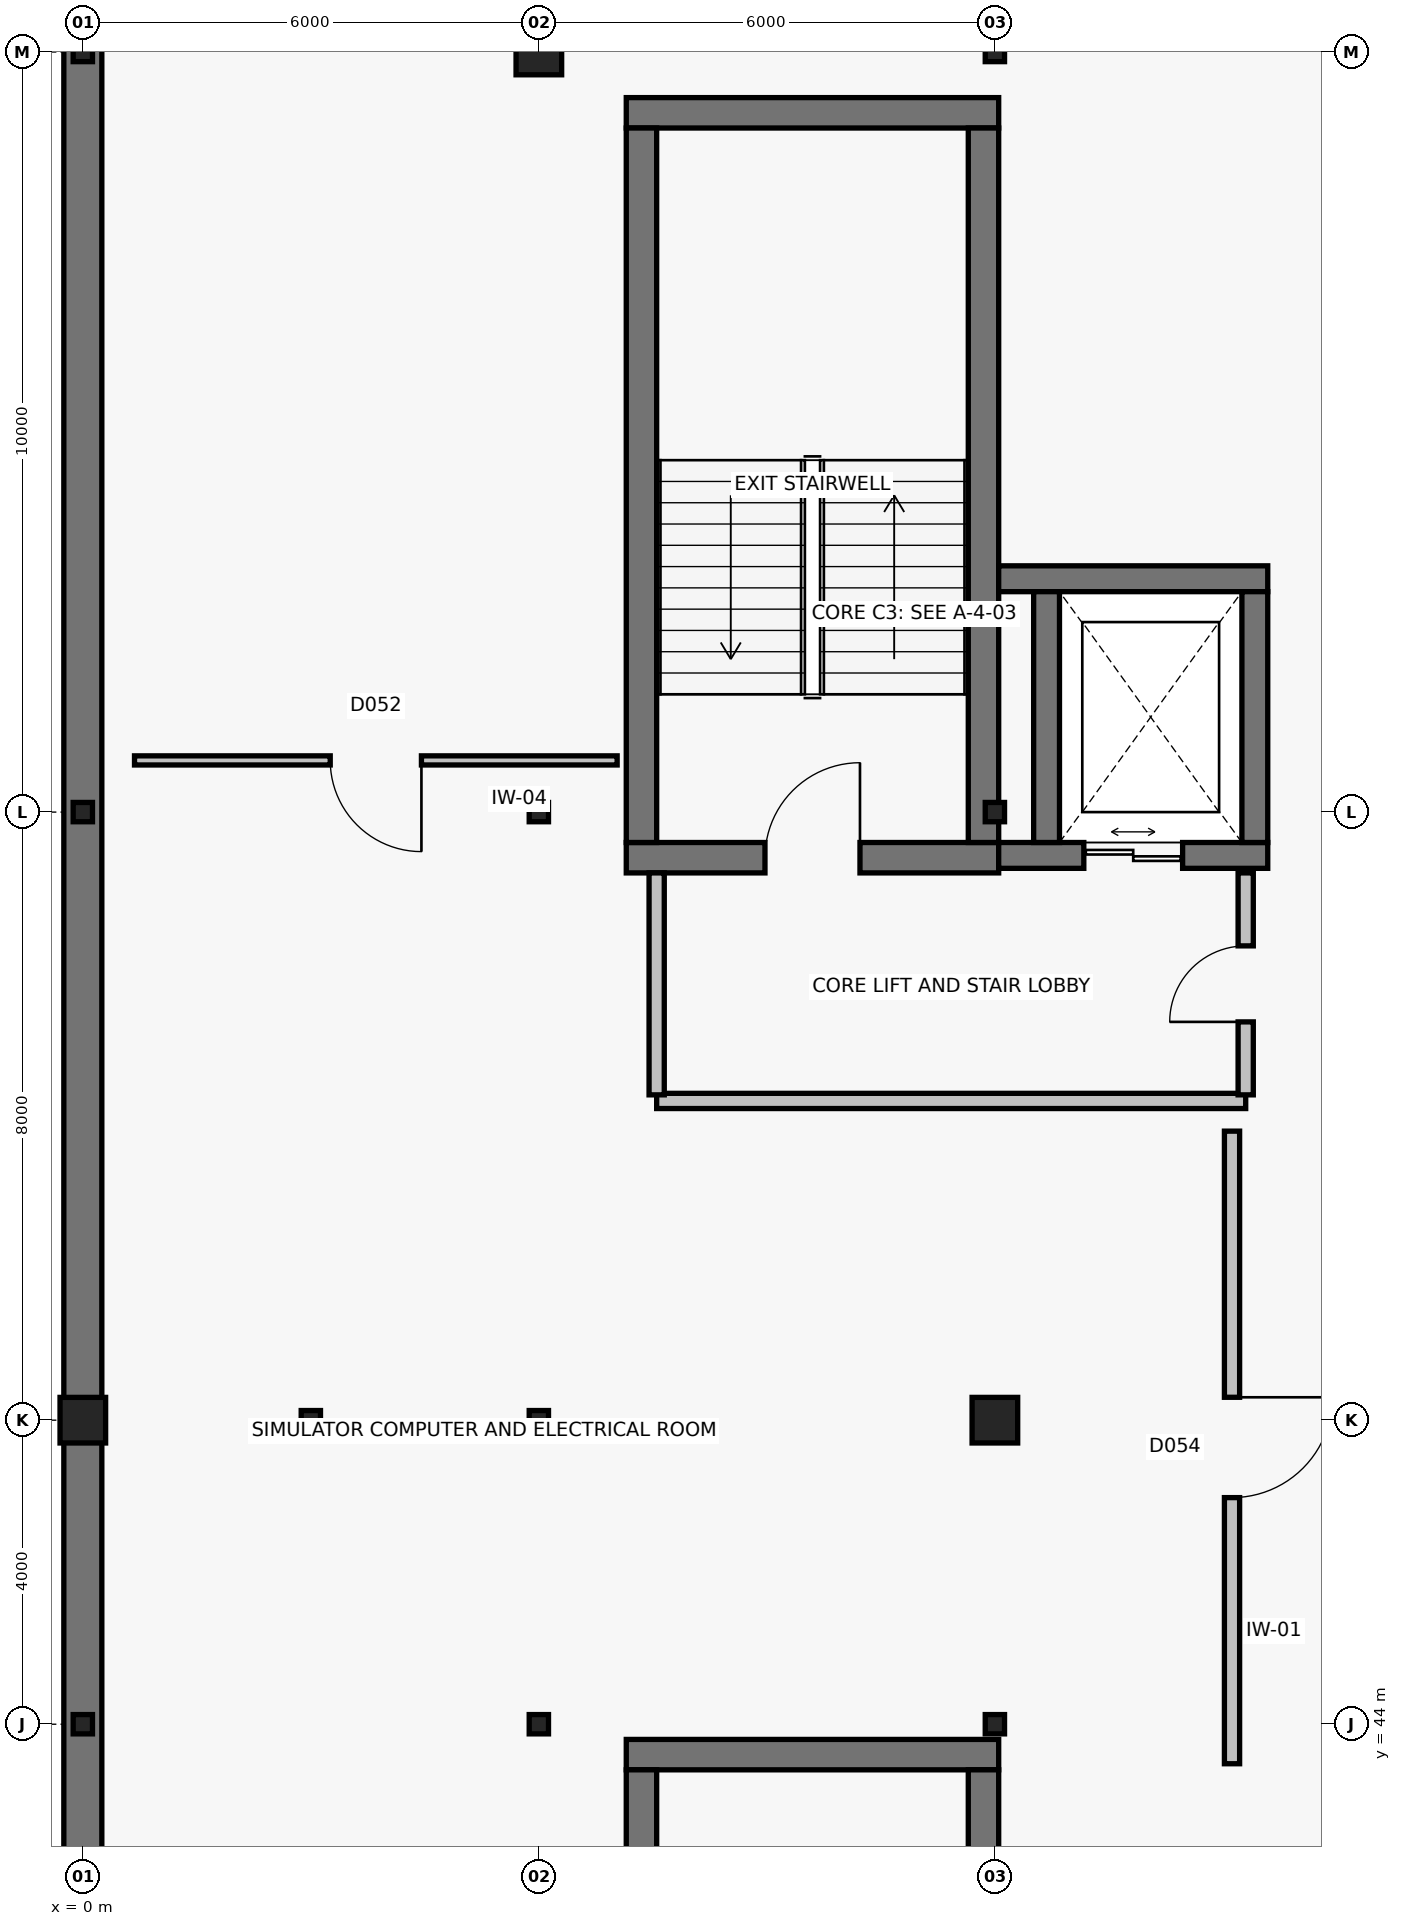
"""IFC4 building model, lengths in metres.
Left out: names, types, materials, properties, quantities, classifications, styles, units other than length and angle.
Written with IfcOpenShell. Run it as: python <this file> out.ifc"""

import sys

from ifc_helpers import new_model, si_unit, direction, frame, frame_2d, origin, origin_2d, place, context, subcontext, project, spatial, rectangle, hollow_rectangle, extrude, element, fill, save


model = new_model("IFC4")
c1 = context("Model", 3, precision=1e-05, world=origin(), true_north=direction((0.0, 1.0)))
c2 = subcontext(c1, "Body", "Model", "MODEL_VIEW")
j1 = project(units=[si_unit("LENGTHUNIT", "METRE"), si_unit("PLANEANGLEUNIT", "RADIAN")], contexts=[c1])
p1 = place(None, origin())
s1 = spatial("IfcSite", under=j1, at=p1, CompositionType="ELEMENT")
p2 = place(p1, origin())
s2 = spatial("IfcBuilding", under=s1, at=p2, CompositionType="ELEMENT")
p3 = place(p2, frame((0.0, 0.0, 15.4)))
s3 = spatial("IfcBuildingStorey", under=s2, at=p3, CompositionType="ELEMENT", Elevation=15.4)
p4 = place(p3, frame((0.0, 44.0, 0.0), z_axis=(0.0, 0.0, 1.0), x_axis=(1.0, 0.0, 0.0)))
e1 = element("IfcColumn", 1, at=p4, inside=s3, PredefinedType="COLUMN", context=c2, shape_type="SweptSolid", body=[
    extrude(hollow_rectangle(XDim=0.254, YDim=0.254, WallThickness=0.01, InnerFilletRadius=0.01, OuterFilletRadius=0.019, at=origin_2d()), origin(), (0.0, 0.0, 1.0), 4.0),
])
p5 = place(p3, frame((0.0, 48.0, 0.0), z_axis=(0.0, 0.0, 1.0), x_axis=(1.0, 0.0, 0.0)))
e2 = element("IfcColumn", 2, at=p5, inside=s3, PredefinedType="COLUMN", context=c2, shape_type="SweptSolid", body=[
    extrude(rectangle(XDim=0.6, YDim=0.6, at=origin_2d()), origin(), (0.0, 0.0, 1.0), 4.0),
])
for number, where, z_axis, x_axis in (
    (3, (0.0, 56.0, 0.0), (0.0, 0.0, 1.0), (1.0, 0.0, 0.0)),
    (4, (0.0, 66.0, 0.0), (0.0, 0.0, 1.0), (1.0, 0.0, 0.0)),
    (5, (3.0, 48.0, 0.0), (0.0, 0.0, 1.0), (1.0, 0.0, 0.0)),
    (6, (6.0, 44.0, 0.0), (0.0, 0.0, 1.0), (1.0, 0.0, 0.0)),
    (7, (6.0, 48.0, 0.0), (0.0, 0.0, 1.0), (1.0, 0.0, 0.0)),
    (8, (6.0, 56.0, 0.0), (0.0, 0.0, 1.0), (1.0, 0.0, 0.0)),
):
    element("IfcColumn", number, at=place(p3, frame(where, z_axis=z_axis, x_axis=x_axis)), inside=s3, PredefinedType="COLUMN", context=c2, shape_type="SweptSolid", body=[
        extrude(hollow_rectangle(XDim=0.254, YDim=0.254, WallThickness=0.01, InnerFilletRadius=0.01, OuterFilletRadius=0.019, at=origin_2d()), origin(), (0.0, 0.0, 1.0), 4.0),
    ])
p6 = place(p3, frame((6.0, 66.0, 0.0), z_axis=(0.0, 0.0, 1.0), x_axis=(1.0, 0.0, 0.0)))
e9 = element("IfcColumn", 9, at=p6, inside=s3, PredefinedType="COLUMN", context=c2, shape_type="SweptSolid", body=[
    extrude(rectangle(XDim=0.6, YDim=0.6, at=origin_2d()), origin(), (0.0, 0.0, 1.0), 4.0),
])
p7 = place(p3, frame((12.0, 44.0, 0.0), z_axis=(0.0, 0.0, 1.0), x_axis=(1.0, 0.0, 0.0)))
e10 = element("IfcColumn", 10, at=p7, inside=s3, PredefinedType="COLUMN", context=c2, shape_type="SweptSolid", body=[
    extrude(hollow_rectangle(XDim=0.254, YDim=0.254, WallThickness=0.01, InnerFilletRadius=0.01, OuterFilletRadius=0.019, at=origin_2d()), origin(), (0.0, 0.0, 1.0), 4.0),
])
p8 = place(p3, frame((12.0, 48.0, 0.0), z_axis=(0.0, 0.0, 1.0), x_axis=(1.0, 0.0, 0.0)))
e11 = element("IfcColumn", 11, at=p8, inside=s3, PredefinedType="COLUMN", context=c2, shape_type="SweptSolid", body=[
    extrude(rectangle(XDim=0.6, YDim=0.6, at=origin_2d()), origin(), (0.0, 0.0, 1.0), 4.0),
])
for number, where, z_axis, x_axis in (
    (12, (12.0, 56.0, 0.0), (0.0, 0.0, 1.0), (1.0, 0.0, 0.0)),
    (13, (12.0, 66.0, 0.0), (0.0, 0.0, 1.0), (1.0, 0.0, 0.0)),
):
    element("IfcColumn", number, at=place(p3, frame(where, z_axis=z_axis, x_axis=x_axis)), inside=s3, PredefinedType="COLUMN", context=c2, shape_type="SweptSolid", body=[
        extrude(hollow_rectangle(XDim=0.254, YDim=0.254, WallThickness=0.01, InnerFilletRadius=0.01, OuterFilletRadius=0.019, at=origin_2d()), origin(), (0.0, 0.0, 1.0), 4.0),
    ])
p9 = place(p3, frame((0.0, -0.008, 0.0), z_axis=(0.0, 0.0, 1.0), x_axis=(0.0, 1.0, 0.0)))
e14 = element("IfcWall", 14, at=p9, inside=s3, PredefinedType="SOLIDWALL", context=c2, shape_type="SweptSolid", body=[
    extrude(rectangle(XDim=74.016, YDim=0.5, at=frame_2d((37.008, 0.0))), origin(), (0.0, 0.0, 1.0), 3.68),
])
p10 = place(p3, frame((12.05, 43.6, 0.0), z_axis=(0.0, 0.0, 1.0), x_axis=(-1.0, 0.0, 0.0)))
e15 = element("IfcWall", 15, at=p10, inside=s3, PredefinedType="SHEAR", context=c2, shape_type="SweptSolid", body=[
    extrude(rectangle(XDim=4.9, YDim=0.4, at=frame_2d((2.45, 0.0))), origin(), (0.0, 0.0, 1.0), 3.7),
])
for number, where, z_axis, x_axis in (
    (16, (7.35, 43.4, 0.0), (0.0, 0.0, 1.0), (0.0, -1.0, 0.0)),
    (17, (11.85, 34.0, 0.0), (0.0, 0.0, 1.0), (0.0, 1.0, 0.0)),
):
    element("IfcWall", number, at=place(p3, frame(where, z_axis=z_axis, x_axis=x_axis)), inside=s3, PredefinedType="SHEAR", context=c2, shape_type="SweptSolid", body=[
        extrude(rectangle(XDim=9.4, YDim=0.4, at=frame_2d((4.7, 0.0))), origin(), (0.0, 0.0, 1.0), 3.7),
    ])
p11 = place(p3, frame((7.15, 55.4, 0.0), z_axis=(0.0, 0.0, 1.0), x_axis=(1.0, 0.0, 0.0)))
e18 = element("IfcWall", 18, at=p11, inside=s3, PredefinedType="SHEAR", context=c2, shape_type="SweptSolid", body=[
    extrude(rectangle(XDim=4.9, YDim=0.4, at=frame_2d((2.45, 0.0))), origin(), (0.0, 0.0, 1.0), 3.7),
])
p12 = place(p11, frame((1.825, 0.0, 0.0)))
e19 = element("IfcOpeningElement", 19, at=p12, cuts=e18, PredefinedType="OPENING", context=c2, shape_type="SweptSolid", body=[
    extrude(rectangle(XDim=1.25, YDim=2.2, at=frame_2d((0.625, 1.1))), frame((0.0, 0.215, 0.0), z_axis=(0.0, -1.0, 0.0), x_axis=(1.0, 0.0, 0.0)), (0.0, 0.0, 1.0), 0.43),
])
p13 = place(p3, frame((12.05, 65.2, 0.0), z_axis=(0.0, 0.0, 1.0), x_axis=(-1.0, 0.0, 0.0)))
e20 = element("IfcWall", 20, at=p13, inside=s3, PredefinedType="SHEAR", context=c2, shape_type="SweptSolid", body=[
    extrude(rectangle(XDim=4.9, YDim=0.4, at=frame_2d((2.45, 0.0))), origin(), (0.0, 0.0, 1.0), 3.7),
])
for number, where, z_axis, x_axis in (
    (21, (7.35, 65.0, 0.0), (0.0, 0.0, 1.0), (0.0, -1.0, 0.0)),
    (22, (11.85, 55.6, 0.0), (0.0, 0.0, 1.0), (0.0, 1.0, 0.0)),
):
    element("IfcWall", number, at=place(p3, frame(where, z_axis=z_axis, x_axis=x_axis)), inside=s3, PredefinedType="SHEAR", context=c2, shape_type="SweptSolid", body=[
        extrude(rectangle(XDim=9.4, YDim=0.4, at=frame_2d((4.7, 0.0))), origin(), (0.0, 0.0, 1.0), 3.7),
    ])
p14 = place(p3, frame((12.05, 55.43, 0.0), z_axis=(0.0, 0.0, 1.0), x_axis=(1.0, 0.0, 0.0)))
e23 = element("IfcWall", 23, at=p14, inside=s3, PredefinedType="SHEAR", context=c2, shape_type="SweptSolid", body=[
    extrude(rectangle(XDim=3.54, YDim=0.34, at=frame_2d((1.77, 0.0))), origin(), (0.0, 0.0, 1.0), 3.7),
])
p15 = place(p14, frame((1.12, 0.0, 0.0)))
e24 = element("IfcOpeningElement", 24, at=p15, cuts=e23, PredefinedType="OPENING", context=c2, shape_type="SweptSolid", body=[
    extrude(rectangle(XDim=1.3, YDim=2.25, at=frame_2d((0.65, 1.125))), frame((0.0, 0.185, 0.0), z_axis=(0.0, -1.0, 0.0), x_axis=(1.0, 0.0, 0.0)), (0.0, 0.0, 1.0), 0.37),
])
p16 = place(p3, frame((15.59, 59.07, 0.0), z_axis=(0.0, 0.0, 1.0), x_axis=(-1.0, 0.0, 0.0)))
e25 = element("IfcWall", 25, at=p16, inside=s3, PredefinedType="SHEAR", context=c2, shape_type="SweptSolid", body=[
    extrude(rectangle(XDim=3.54, YDim=0.34, at=frame_2d((1.77, 0.0))), origin(), (0.0, 0.0, 1.0), 3.7),
])
for number, where, z_axis, x_axis in (
    (26, (12.68, 58.9, 0.0), (0.0, 0.0, 1.0), (0.0, -1.0, 0.0)),
    (27, (15.42, 55.6, 0.0), (0.0, 0.0, 1.0), (0.0, 1.0, 0.0)),
):
    element("IfcWall", number, at=place(p3, frame(where, z_axis=z_axis, x_axis=x_axis)), inside=s3, PredefinedType="SHEAR", context=c2, shape_type="SweptSolid", body=[
        extrude(rectangle(XDim=3.3, YDim=0.34, at=frame_2d((1.65, 0.0))), origin(), (0.0, 0.0, 1.0), 3.7),
    ])
p17 = place(p3, frame((7.55, 52.2, 0.0), z_axis=(0.0, 0.0, 1.0), x_axis=(1.0, 0.0, 0.0)))
e28 = element("IfcWall", 28, at=p17, inside=s3, PredefinedType="PARTITIONING", context=c2, shape_type="SweptSolid", body=[
    extrude(rectangle(XDim=7.75, YDim=0.2, at=frame_2d((3.875, 0.0))), origin(), (0.0, 0.0, 1.0), 2.957),
])
p18 = place(p3, frame((7.55, 55.2, 0.0), z_axis=(0.0, 0.0, 1.0), x_axis=(0.0, -1.0, 0.0)))
e29 = element("IfcWall", 29, at=p18, inside=s3, PredefinedType="PARTITIONING", context=c2, shape_type="SweptSolid", body=[
    extrude(rectangle(XDim=2.92, YDim=0.2, at=frame_2d((1.46, 0.0))), origin(), (0.0, 0.0, 1.0), 3.68),
])
p19 = place(p3, frame((15.3, 52.28, 0.0), z_axis=(0.0, 0.0, 1.0), x_axis=(0.0, 1.0, 0.0)))
e30 = element("IfcWall", 30, at=p19, inside=s3, PredefinedType="PARTITIONING", context=c2, shape_type="SweptSolid", body=[
    extrude(rectangle(XDim=2.92, YDim=0.2, at=frame_2d((1.46, 0.0))), origin(), (0.0, 0.0, 1.0), 3.68),
])
p20 = place(p19, frame((0.96, 0.0, 0.0)))
e31 = element("IfcOpeningElement", 31, at=p20, cuts=e30, PredefinedType="OPENING", context=c2, shape_type="SweptSolid", body=[
    extrude(rectangle(XDim=1.0, YDim=2.15, at=frame_2d((0.5, 1.075))), frame((0.0, 0.115, 0.0), z_axis=(0.0, -1.0, 0.0), x_axis=(1.0, 0.0, 0.0)), (0.0, 0.0, 1.0), 0.23),
])
p21 = place(p3, frame((7.03, 56.68, 0.0), z_axis=(0.0, 0.0, 1.0), x_axis=(-1.0, 0.0, 0.0)))
e32 = element("IfcWall", 32, at=p21, inside=s3, PredefinedType="PARTITIONING", context=c2, shape_type="SweptSolid", body=[
    extrude(rectangle(XDim=6.35, YDim=0.12, at=frame_2d((3.175, 0.0))), origin(), (0.0, 0.0, 1.0), 2.957),
])
p22 = place(p21, frame((2.575, 0.0, 0.0)))
e33 = element("IfcOpeningElement", 33, at=p22, cuts=e32, PredefinedType="OPENING", context=c2, shape_type="SweptSolid", body=[
    extrude(rectangle(XDim=1.2, YDim=2.15, at=frame_2d((0.6, 1.075))), frame((0.0, 0.075, 0.0), z_axis=(0.0, -1.0, 0.0), x_axis=(1.0, 0.0, 0.0)), (0.0, 0.0, 1.0), 0.15),
])
p23 = place(p3, frame((15.12, 51.802, 0.0), z_axis=(0.0, 0.0, 1.0), x_axis=(0.0, -1.0, 0.0)))
e34 = element("IfcWall", 34, at=p23, inside=s3, PredefinedType="PARTITIONING", context=c2, shape_type="SweptSolid", body=[
    extrude(rectangle(XDim=8.323, YDim=0.2, at=frame_2d((4.161, 0.0))), origin(), (0.0, 0.0, 1.0), 3.187),
])
p24 = place(p23, frame((3.501, 0.0, 0.0)))
e35 = element("IfcOpeningElement", 35, at=p24, cuts=e34, PredefinedType="OPENING", context=c2, shape_type="SweptSolid", body=[
    extrude(rectangle(XDim=1.32, YDim=2.2, at=frame_2d((0.66, 1.1))), frame((0.0, 0.115, 0.0), z_axis=(0.0, -1.0, 0.0), x_axis=(1.0, 0.0, 0.0)), (0.0, 0.0, 1.0), 0.23),
])
p25 = place(p12, origin())
e36 = element("IfcDoor", 36, at=p25, inside=s3, OperationType="SINGLE_SWING_RIGHT", PredefinedType="DOOR", context=c2, shape_type="SweptSolid", body=[
    extrude(rectangle(XDim=1.25, YDim=2.2, at=frame_2d((0.625, 1.1))), frame((0.0, 0.025, 0.0), z_axis=(0.0, -1.0, 0.0), x_axis=(1.0, 0.0, 0.0)), (0.0, 0.0, 1.0), 0.05),
])
fill(e19, e36)
p26 = place(p15, origin())
e37 = element("IfcDoor", 37, at=p26, inside=s3, OperationType="DOUBLE_DOOR_SLIDING", PredefinedType="DOOR", context=c2, shape_type="SweptSolid", body=[
    extrude(rectangle(XDim=1.3, YDim=2.25, at=frame_2d((0.65, 1.125))), frame((0.0, 0.025, 0.0), z_axis=(0.0, -1.0, 0.0), x_axis=(1.0, 0.0, 0.0)), (0.0, 0.0, 1.0), 0.05),
])
fill(e24, e37)
p27 = place(p20, origin())
e38 = element("IfcDoor", 38, at=p27, inside=s3, OperationType="SINGLE_SWING_LEFT", PredefinedType="DOOR", context=c2, shape_type="SweptSolid", body=[
    extrude(rectangle(XDim=1.0, YDim=2.15, at=frame_2d((0.5, 1.075))), frame((0.0, 0.025, 0.0), z_axis=(0.0, -1.0, 0.0), x_axis=(1.0, 0.0, 0.0)), (0.0, 0.0, 1.0), 0.05),
])
fill(e31, e38)
p28 = place(p22, origin())
e39 = element("IfcDoor", 39, at=p28, inside=s3, OperationType="SINGLE_SWING_LEFT", PredefinedType="DOOR", context=c2, shape_type="SweptSolid", body=[
    extrude(rectangle(XDim=1.2, YDim=2.15, at=frame_2d((0.6, 1.075))), frame((0.0, 0.025, 0.0), z_axis=(0.0, -1.0, 0.0), x_axis=(1.0, 0.0, 0.0)), (0.0, 0.0, 1.0), 0.05),
])
fill(e33, e39)
p29 = place(p24, origin())
e40 = element("IfcDoor", 40, at=p29, inside=s3, OperationType="SINGLE_SWING_LEFT", PredefinedType="DOOR", context=c2, shape_type="SweptSolid", body=[
    extrude(rectangle(XDim=1.32, YDim=2.2, at=frame_2d((0.66, 1.1))), frame((0.0, 0.025, 0.0), z_axis=(0.0, -1.0, 0.0), x_axis=(1.0, 0.0, 0.0)), (0.0, 0.0, 1.0), 0.05),
])
fill(e35, e40)
save(model, sys.argv[1])
